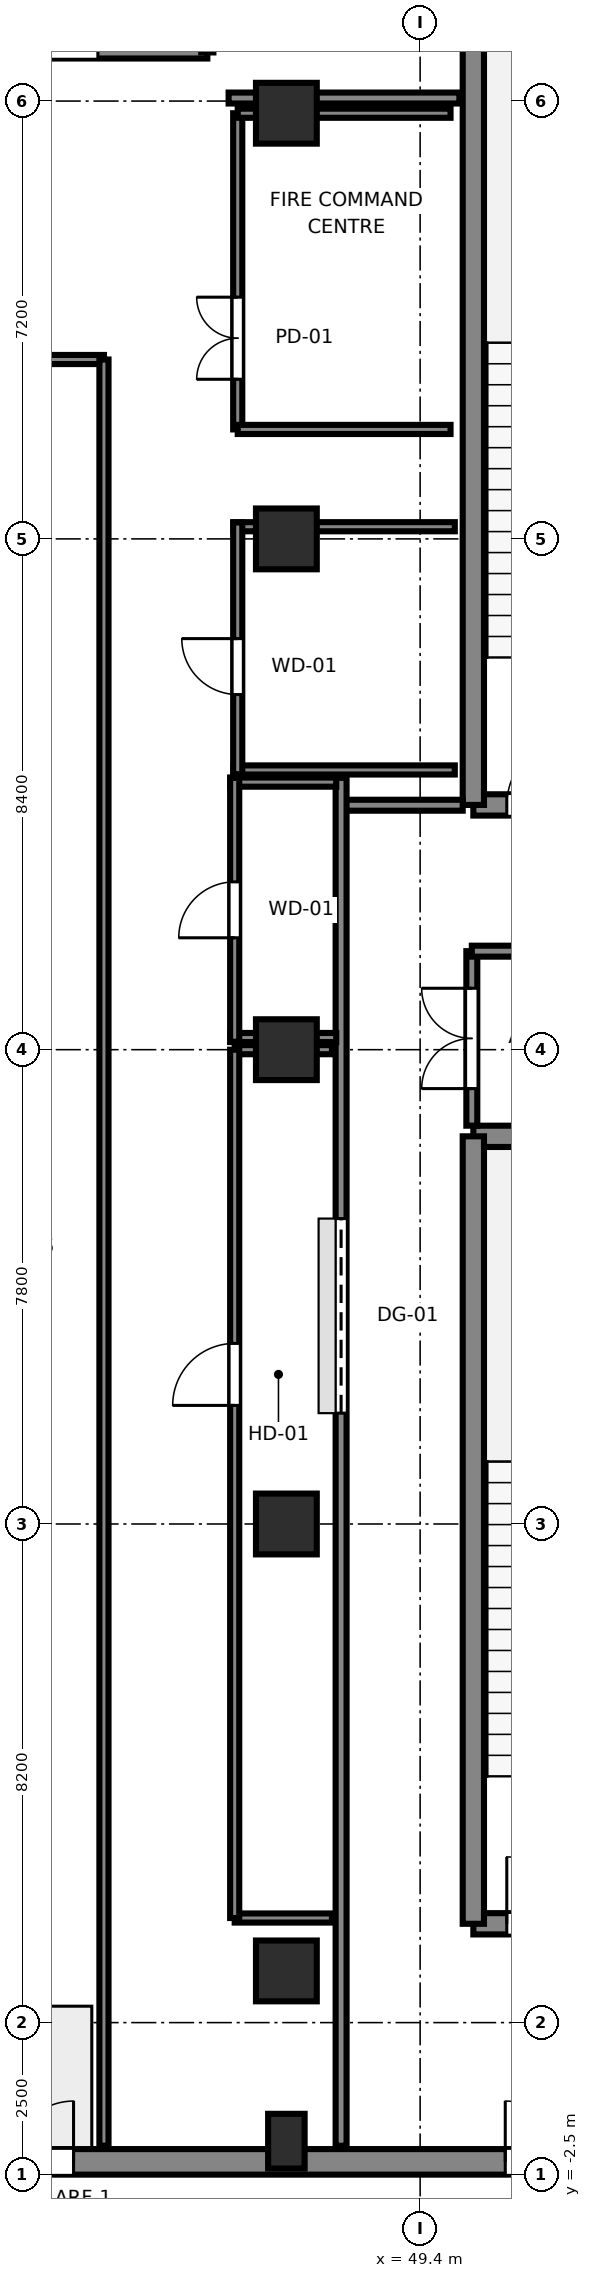
"""IFC4 building model, lengths in metres.
Left out: names, types, materials, properties, quantities, classifications, styles, units other than length and angle.
Written with IfcOpenShell. Run it as: python <this file> out.ifc"""

import sys

from ifc_helpers import new_model, si_unit, direction, frame, frame_2d, origin, origin_2d, place, context, subcontext, project, spatial, rectangle, extrude, source, transform, mapped, element, fill, save


model = new_model("IFC4")
c1 = context("Model", 3, precision=1e-05, world=origin(), true_north=direction((0.0, 1.0)))
c2 = subcontext(c1, "Body", "Model", "MODEL_VIEW")
j1 = project(units=[si_unit("LENGTHUNIT", "METRE"), si_unit("PLANEANGLEUNIT", "RADIAN")], contexts=[c1])
p1 = place(None, origin())
s1 = spatial("IfcSite", under=j1, at=p1, CompositionType="ELEMENT")
p2 = place(p1, origin())
s2 = spatial("IfcBuilding", under=s1, at=p2, CompositionType="ELEMENT")
p3 = place(p2, origin())
s3 = spatial("IfcBuildingStorey", under=s2, at=p3, CompositionType="ELEMENT", Elevation=0.0)
p4 = place(p3, frame((50.275, 1.625, 0.0), z_axis=(0.0, 0.0, 1.0), x_axis=(1.0, 0.0, 0.0)))
e1 = element("IfcWall", 1, at=p4, inside=s3, PredefinedType="SHEAR", context=c2, shape_type="SweptSolid", body=[
    extrude(rectangle(XDim=5.0, YDim=0.35, at=frame_2d((2.5, 0.0))), origin(), (0.0, 0.0, 1.0), 6.0),
])
p5 = place(p4, frame((1.65, 0.0, 0.0), z_axis=(0.0, 0.0, 1.0), x_axis=(-1.0, 0.0, 0.0)))
e2 = element("IfcOpeningElement", 2, at=p5, cuts=e1, PredefinedType="OPENING", context=c2, shape_type="SweptSolid", body=[
    extrude(rectangle(XDim=1.1, YDim=2.12, at=frame_2d((0.55, 1.06))), frame((0.0, 0.185, 0.0), z_axis=(0.0, -1.0, 0.0), x_axis=(1.0, 0.0, 0.0)), (0.0, 0.0, 1.0), 0.37),
])
p6 = place(p3, frame((55.275, 14.575, 0.0), z_axis=(0.0, 0.0, 1.0), x_axis=(-1.0, 0.0, 0.0)))
e3 = element("IfcWall", 3, at=p6, inside=s3, PredefinedType="SHEAR", context=c2, shape_type="SweptSolid", body=[
    extrude(rectangle(XDim=5.0, YDim=0.35, at=frame_2d((2.5, 0.0))), origin(), (0.0, 0.0, 1.0), 6.0),
])
p7 = place(p3, frame((50.275, 14.575, 0.0), z_axis=(0.0, 0.0, 1.0), x_axis=(0.0, -1.0, 0.0)))
e4 = element("IfcWall", 4, at=p7, inside=s3, PredefinedType="SHEAR", context=c2, shape_type="SweptSolid", body=[
    extrude(rectangle(XDim=12.95, YDim=0.35, at=frame_2d((6.475, 0.0))), origin(), (0.0, 0.0, 1.0), 6.0),
])
p8 = place(p3, frame((50.275, 20.025, 0.0), z_axis=(0.0, 0.0, 1.0), x_axis=(1.0, 0.0, 0.0)))
e5 = element("IfcWall", 5, at=p8, inside=s3, PredefinedType="SHEAR", context=c2, shape_type="SweptSolid", body=[
    extrude(rectangle(XDim=5.0, YDim=0.35, at=frame_2d((2.5, 0.0))), origin(), (0.0, 0.0, 1.0), 6.0),
])
p9 = place(p8, frame((1.65, 0.0, 0.0), z_axis=(0.0, 0.0, 1.0), x_axis=(-1.0, 0.0, 0.0)))
e6 = element("IfcOpeningElement", 6, at=p9, cuts=e5, PredefinedType="OPENING", context=c2, shape_type="SweptSolid", body=[
    extrude(rectangle(XDim=1.1, YDim=2.12, at=frame_2d((0.55, 1.06))), frame((0.0, 0.185, 0.0), z_axis=(0.0, -1.0, 0.0), x_axis=(1.0, 0.0, 0.0)), (0.0, 0.0, 1.0), 0.37),
])
p10 = place(p3, frame((50.275, 32.975, 0.0), z_axis=(0.0, 0.0, 1.0), x_axis=(0.0, -1.0, 0.0)))
e7 = element("IfcWall", 7, at=p10, inside=s3, PredefinedType="SHEAR", context=c2, shape_type="SweptSolid", body=[
    extrude(rectangle(XDim=12.95, YDim=0.35, at=frame_2d((6.475, 0.0))), origin(), (0.0, 0.0, 1.0), 6.0),
])
m1 = source(origin(), c2, "Body", "SweptSolid", [
    extrude(rectangle(XDim=1.0, YDim=1.0, at=origin_2d()), origin(), (0.0, 0.0, 1.0), 6.0),
])
for number, where, z_axis, x_axis in (
    (8, (47.2, 0.85, 0.0), (0.0, 0.0, 1.0), (1.0, 0.0, 0.0)),
    (9, (47.2, 8.2, 0.0), (0.0, 0.0, 1.0), (1.0, 0.0, 0.0)),
    (10, (47.2, 16.0, 0.0), (0.0, 0.0, 1.0), (1.0, 0.0, 0.0)),
    (11, (47.2, 24.4, 0.0), (0.0, 0.0, 1.0), (1.0, 0.0, 0.0)),
    (12, (47.2, 31.4, 0.0), (0.0, 0.0, 1.0), (1.0, 0.0, 0.0)),
):
    element("IfcColumn", number, at=place(p3, frame(where, z_axis=z_axis, x_axis=x_axis)), inside=s3, PredefinedType="COLUMN", context=c2, shape_type="MappedRepresentation", body=[
        mapped(m1, transform((0.0, 0.0, 0.0), x_axis=(1.0, 0.0, 0.0), y_axis=(0.0, 1.0, 0.0), z_axis=(0.0, 0.0, 1.0), scale=1.0)),
    ])
m2 = source(origin(), c2, "Body", "SweptSolid", [
    extrude(rectangle(XDim=0.6, YDim=0.9, at=origin_2d()), origin(), (0.0, 0.0, 1.0), 6.0),
])
p11 = place(p3, frame((47.2, -1.95, 0.0), z_axis=(0.0, 0.0, 1.0), x_axis=(1.0, 0.0, 0.0)))
e13 = element("IfcColumn", 13, at=p11, inside=s3, PredefinedType="PILASTER", context=c2, shape_type="MappedRepresentation", body=[
    mapped(m2, transform((0.0, 0.0, 0.0), x_axis=(1.0, 0.0, 0.0), y_axis=(0.0, 1.0, 0.0), z_axis=(0.0, 0.0, 1.0), scale=1.0)),
])
p12 = place(p3, frame((37.59, -2.29, 0.0), z_axis=(0.0, 0.0, 1.0), x_axis=(1.0, 0.0, 0.0)))
e14 = element("IfcWall", 14, at=p12, inside=s3, PredefinedType="SOLIDWALL", context=c2, shape_type="SweptSolid", body=[
    extrude(rectangle(XDim=27.6, YDim=0.42, at=frame_2d((13.8, 0.0))), origin(), (0.0, 0.0, 1.0), 5.74),
])
p13 = place(p12, frame((6.11, 0.0, 0.0), z_axis=(0.0, 0.0, 1.0), x_axis=(-1.0, 0.0, 0.0)))
e15 = element("IfcOpeningElement", 15, at=p13, cuts=e14, PredefinedType="OPENING", context=c2, shape_type="SweptSolid", body=[
    extrude(rectangle(XDim=2.0, YDim=2.25, at=frame_2d((1.0, 1.125))), frame((0.0, 0.22, 0.0), z_axis=(0.0, -1.0, 0.0), x_axis=(1.0, 0.0, 0.0)), (0.0, 0.0, 1.0), 0.44),
])
p14 = place(p12, frame((15.21, 0.0, 0.0), z_axis=(0.0, 0.0, 1.0), x_axis=(-1.0, 0.0, 0.0)))
e16 = element("IfcOpeningElement", 16, at=p14, cuts=e14, PredefinedType="OPENING", context=c2, shape_type="SweptSolid", body=[
    extrude(rectangle(XDim=2.0, YDim=2.25, at=frame_2d((1.0, 1.125))), frame((0.0, 0.22, 0.0), z_axis=(0.0, -1.0, 0.0), x_axis=(1.0, 0.0, 0.0)), (0.0, 0.0, 1.0), 0.44),
])
p15 = place(p12, frame((24.01, 0.0, 0.0), z_axis=(0.0, 0.0, 1.0), x_axis=(-1.0, 0.0, 0.0)))
e17 = element("IfcOpeningElement", 17, at=p15, cuts=e14, PredefinedType="OPENING", context=c2, shape_type="SweptSolid", body=[
    extrude(rectangle(XDim=2.0, YDim=2.25, at=frame_2d((1.0, 1.125))), frame((0.0, 0.22, 0.0), z_axis=(0.0, -1.0, 0.0), x_axis=(1.0, 0.0, 0.0)), (0.0, 0.0, 1.0), 0.44),
])
p16 = place(p3, frame((42.45, 32.4, 0.0), z_axis=(0.0, 0.0, 1.0), x_axis=(1.0, 0.0, 0.0)))
e18 = element("IfcWall", 18, at=p16, inside=s3, PredefinedType="SOLIDWALL", context=c2, shape_type="SweptSolid", body=[
    extrude(rectangle(XDim=3.45, YDim=0.2, at=frame_2d((1.725, 0.0))), origin(), (0.0, 0.0, 1.0), 5.74),
])
p17 = place(p16, frame((1.65, 0.0, 0.0), z_axis=(0.0, 0.0, 1.0), x_axis=(-1.0, 0.0, 0.0)))
e19 = element("IfcOpeningElement", 19, at=p17, cuts=e18, PredefinedType="OPENING", context=c2, shape_type="SweptSolid", body=[
    extrude(rectangle(XDim=1.1, YDim=2.12, at=frame_2d((0.55, 1.06))), frame((0.0, 0.11, 0.0), z_axis=(0.0, -1.0, 0.0), x_axis=(1.0, 0.0, 0.0)), (0.0, 0.0, 1.0), 0.22),
])
p18 = place(p3, frame((46.25, 31.65, 0.0), z_axis=(0.0, 0.0, 1.0), x_axis=(1.0, 0.0, 0.0)))
e20 = element("IfcWall", 20, at=p18, inside=s3, PredefinedType="PARTITIONING", context=c2, shape_type="SweptSolid", body=[
    extrude(rectangle(XDim=3.795, YDim=0.18, at=frame_2d((1.897, 0.0))), origin(), (0.0, 0.0, 1.0), 5.74),
])
p19 = place(p3, frame((50.25, 14.75, 0.0), z_axis=(0.0, 0.0, 1.0), x_axis=(0.0, 1.0, 0.0)))
e21 = element("IfcWall", 21, at=p19, inside=s3, PredefinedType="PARTITIONING", context=c2, shape_type="SweptSolid", body=[
    extrude(rectangle(XDim=2.87, YDim=0.18, at=frame_2d((1.435, 0.0))), origin(), (0.0, 0.0, 1.0), 5.74),
])
p20 = place(p19, frame((0.61, 0.0, 0.0)))
e22 = element("IfcOpeningElement", 22, at=p20, cuts=e21, PredefinedType="OPENING", context=c2, shape_type="SweptSolid", body=[
    extrude(rectangle(XDim=1.65, YDim=2.15, at=frame_2d((0.825, 1.075))), frame((0.0, 0.1, 0.0), z_axis=(0.0, -1.0, 0.0), x_axis=(1.0, 0.0, 0.0)), (0.0, 0.0, 1.0), 0.2),
])
p21 = place(p3, frame((50.25, 17.62, 0.0), z_axis=(0.0, 0.0, 1.0), x_axis=(1.0, 0.0, 0.0)))
e23 = element("IfcWall", 23, at=p21, inside=s3, PredefinedType="PARTITIONING", context=c2, shape_type="SweptSolid", body=[
    extrude(rectangle(XDim=5.15, YDim=0.18, at=frame_2d((2.575, 0.0))), origin(), (0.0, 0.0, 1.0), 5.74),
])
p22 = place(p3, frame((48.1, 20.02, 0.0), z_axis=(0.0, 0.0, 1.0), x_axis=(1.0, 0.0, 0.0)))
e24 = element("IfcWall", 24, at=p22, inside=s3, PredefinedType="PARTITIONING", context=c2, shape_type="SweptSolid", body=[
    extrude(rectangle(XDim=2.0, YDim=0.18, at=frame_2d((1.0, 0.0))), origin(), (0.0, 0.0, 1.0), 5.74),
])
p23 = place(p3, frame((48.1, -2.025, 0.0), z_axis=(0.0, 0.0, 1.0), x_axis=(0.0, 1.0, 0.0)))
e25 = element("IfcWall", 25, at=p23, inside=s3, PredefinedType="PARTITIONING", context=c2, shape_type="SweptSolid", body=[
    extrude(rectangle(XDim=22.495, YDim=0.18, at=frame_2d((11.248, 0.0))), origin(), (0.0, 0.0, 1.0), 5.74),
])
p24 = place(p23, frame((12.048, 0.0, 0.0)))
e26 = element("IfcOpeningElement", 26, at=p24, cuts=e25, PredefinedType="OPENING", context=c2, shape_type="SweptSolid", body=[
    extrude(rectangle(XDim=3.2, YDim=2.8, at=frame_2d((1.6, 1.4))), frame((0.0, 0.1, 0.0), z_axis=(0.0, -1.0, 0.0), x_axis=(1.0, 0.0, 0.0)), (0.0, 0.0, 1.0), 0.2),
])
p25 = place(p3, frame((46.4, 26.2, 0.0), z_axis=(0.0, 0.0, 1.0), x_axis=(0.0, 1.0, 0.0)))
e27 = element("IfcWall", 27, at=p25, inside=s3, PredefinedType="PARTITIONING", context=c2, shape_type="SweptSolid", body=[
    extrude(rectangle(XDim=5.2, YDim=0.15, at=frame_2d((2.6, 0.0))), origin(), (0.0, 0.0, 1.0), 5.74),
])
p26 = place(p25, frame((0.825, 0.0, 0.0)))
e28 = element("IfcOpeningElement", 28, at=p26, cuts=e27, PredefinedType="OPENING", context=c2, shape_type="SweptSolid", body=[
    extrude(rectangle(XDim=1.35, YDim=2.15, at=frame_2d((0.675, 1.075))), frame((0.0, 0.085, 0.0), z_axis=(0.0, -1.0, 0.0), x_axis=(1.0, 0.0, 0.0)), (0.0, 0.0, 1.0), 0.17),
])
p27 = place(p3, frame((46.4, 26.2, 0.0), z_axis=(0.0, 0.0, 1.0), x_axis=(1.0, 0.0, 0.0)))
e29 = element("IfcWall", 29, at=p27, inside=s3, PredefinedType="PARTITIONING", context=c2, shape_type="SweptSolid", body=[
    extrude(rectangle(XDim=3.5, YDim=0.15, at=frame_2d((1.75, 0.0))), origin(), (0.0, 0.0, 1.0), 5.74),
])
p28 = place(p3, frame((46.4, 31.4, 0.0), z_axis=(0.0, 0.0, 1.0), x_axis=(1.0, 0.0, 0.0)))
e30 = element("IfcWall", 30, at=p28, inside=s3, PredefinedType="PARTITIONING", context=c2, shape_type="SweptSolid", body=[
    extrude(rectangle(XDim=3.5, YDim=0.15, at=frame_2d((1.75, 0.0))), origin(), (0.0, 0.0, 1.0), 4.914),
])
p29 = place(p3, frame((38.0, 27.35, 0.0), z_axis=(0.0, 0.0, 1.0), x_axis=(1.0, 0.0, 0.0)))
e31 = element("IfcWall", 31, at=p29, inside=s3, PredefinedType="PARTITIONING", context=c2, shape_type="SweptSolid", body=[
    extrude(rectangle(XDim=6.2, YDim=0.15, at=frame_2d((3.1, 0.0))), origin(), (0.0, 0.0, 1.0), 5.74),
])
p30 = place(p29, frame((2.275, 0.0, 0.0)))
e32 = element("IfcOpeningElement", 32, at=p30, cuts=e31, PredefinedType="OPENING", context=c2, shape_type="SweptSolid", body=[
    extrude(rectangle(XDim=1.65, YDim=2.15, at=frame_2d((0.825, 1.075))), frame((0.0, 0.085, 0.0), z_axis=(0.0, -1.0, 0.0), x_axis=(1.0, 0.0, 0.0)), (0.0, 0.0, 1.0), 0.17),
])
p31 = place(p3, frame((44.2, -2.025, 0.0), z_axis=(0.0, 0.0, 1.0), x_axis=(0.0, 1.0, 0.0)))
e33 = element("IfcWall", 33, at=p31, inside=s3, PredefinedType="PARTITIONING", context=c2, shape_type="SweptSolid", body=[
    extrude(rectangle(XDim=29.375, YDim=0.15, at=frame_2d((14.688, 0.0))), origin(), (0.0, 0.0, 1.0), 5.276),
])
p32 = place(p3, frame((46.28, 16.2, 0.0), z_axis=(0.0, 0.0, 1.0), x_axis=(1.0, 0.0, 0.0)))
e34 = element("IfcWall", 34, at=p32, inside=s3, PredefinedType="PARTITIONING", context=c2, shape_type="SweptSolid", body=[
    extrude(rectangle(XDim=1.74, YDim=0.15, at=frame_2d((0.87, 0.0))), origin(), (0.0, 0.0, 1.0), 4.914),
])
p33 = place(p3, frame((46.28, 20.4, 0.0), z_axis=(0.0, 0.0, 1.0), x_axis=(1.0, 0.0, 0.0)))
e35 = element("IfcWall", 35, at=p33, inside=s3, PredefinedType="PARTITIONING", context=c2, shape_type="SweptSolid", body=[
    extrude(rectangle(XDim=1.74, YDim=0.15, at=frame_2d((0.87, 0.0))), origin(), (0.0, 0.0, 1.0), 5.74),
])
p34 = place(p3, frame((46.35, 16.13, 0.0), z_axis=(0.0, 0.0, 1.0), x_axis=(0.0, 1.0, 0.0)))
e36 = element("IfcWall", 36, at=p34, inside=s3, PredefinedType="PARTITIONING", context=c2, shape_type="SweptSolid", body=[
    extrude(rectangle(XDim=4.34, YDim=0.15, at=frame_2d((2.17, 0.0))), origin(), (0.0, 0.0, 1.0), 5.74),
])
p35 = place(p34, frame((1.71, 0.0, 0.0)))
e37 = element("IfcOpeningElement", 37, at=p35, cuts=e36, PredefinedType="OPENING", context=c2, shape_type="SweptSolid", body=[
    extrude(rectangle(XDim=0.92, YDim=2.01, at=frame_2d((0.46, 1.005))), frame((0.0, 0.085, 0.0), z_axis=(0.0, -1.0, 0.0), x_axis=(1.0, 0.0, 0.0)), (0.0, 0.0, 1.0), 0.17),
])
p36 = place(p3, frame((46.33, 20.6, 0.0), z_axis=(0.0, 0.0, 1.0), x_axis=(1.0, 0.0, 0.0)))
e38 = element("IfcWall", 38, at=p36, inside=s3, PredefinedType="PARTITIONING", context=c2, shape_type="SweptSolid", body=[
    extrude(rectangle(XDim=3.64, YDim=0.15, at=frame_2d((1.82, 0.0))), origin(), (0.0, 0.0, 1.0), 5.74),
])
p37 = place(p3, frame((46.33, 24.6, 0.0), z_axis=(0.0, 0.0, 1.0), x_axis=(1.0, 0.0, 0.0)))
e39 = element("IfcWall", 39, at=p37, inside=s3, PredefinedType="PARTITIONING", context=c2, shape_type="SweptSolid", body=[
    extrude(rectangle(XDim=3.64, YDim=0.15, at=frame_2d((1.82, 0.0))), origin(), (0.0, 0.0, 1.0), 4.914),
])
p38 = place(p3, frame((46.4, 20.53, 0.0), z_axis=(0.0, 0.0, 1.0), x_axis=(0.0, 1.0, 0.0)))
e40 = element("IfcWall", 40, at=p38, inside=s3, PredefinedType="PARTITIONING", context=c2, shape_type="SweptSolid", body=[
    extrude(rectangle(XDim=4.14, YDim=0.15, at=frame_2d((2.07, 0.0))), origin(), (0.0, 0.0, 1.0), 5.74),
])
p39 = place(p38, frame((1.31, 0.0, 0.0)))
e41 = element("IfcOpeningElement", 41, at=p39, cuts=e40, PredefinedType="OPENING", context=c2, shape_type="SweptSolid", body=[
    extrude(rectangle(XDim=0.92, YDim=2.01, at=frame_2d((0.46, 1.005))), frame((0.0, 0.085, 0.0), z_axis=(0.0, -1.0, 0.0), x_axis=(1.0, 0.0, 0.0)), (0.0, 0.0, 1.0), 0.17),
])
p40 = place(p3, frame((46.35, 1.72, 0.0), z_axis=(0.0, 0.0, 1.0), x_axis=(1.0, 0.0, 0.0)))
e42 = element("IfcWall", 42, at=p40, inside=s3, PredefinedType="PARTITIONING", context=c2, shape_type="SweptSolid", body=[
    extrude(rectangle(XDim=1.6, YDim=0.15, at=frame_2d((0.8, 0.0))), origin(), (0.0, 0.0, 1.0), 5.74),
])
p41 = place(p3, frame((46.35, 16.0, 0.0), z_axis=(0.0, 0.0, 1.0), x_axis=(1.0, 0.0, 0.0)))
e43 = element("IfcWall", 43, at=p41, inside=s3, PredefinedType="PARTITIONING", context=c2, shape_type="SweptSolid", body=[
    extrude(rectangle(XDim=1.6, YDim=0.15, at=frame_2d((0.8, 0.0))), origin(), (0.0, 0.0, 1.0), 4.914),
])
p42 = place(p3, frame((46.35, 1.72, 0.0), z_axis=(0.0, 0.0, 1.0), x_axis=(0.0, 1.0, 0.0)))
e44 = element("IfcWall", 44, at=p42, inside=s3, PredefinedType="PARTITIONING", context=c2, shape_type="SweptSolid", body=[
    extrude(rectangle(XDim=14.28, YDim=0.15, at=frame_2d((7.14, 0.0))), origin(), (0.0, 0.0, 1.0), 5.74),
])
p43 = place(p42, frame((8.43, 0.0, 0.0)))
e45 = element("IfcOpeningElement", 45, at=p43, cuts=e44, PredefinedType="OPENING", context=c2, shape_type="SweptSolid", body=[
    extrude(rectangle(XDim=1.02, YDim=2.03, at=frame_2d((0.51, 1.015))), frame((0.0, 0.085, 0.0), z_axis=(0.0, -1.0, 0.0), x_axis=(1.0, 0.0, 0.0)), (0.0, 0.0, 1.0), 0.17),
])
m3 = source(origin(), c2, "Body", "SweptSolid", [
    extrude(rectangle(XDim=2.0, YDim=2.25, at=frame_2d((1.0, 1.125))), frame((0.0, 0.025, 0.0), z_axis=(0.0, -1.0, 0.0), x_axis=(1.0, 0.0, 0.0)), (0.0, 0.0, 1.0), 0.05),
])
p44 = place(p13, origin())
e46 = element("IfcDoor", 46, at=p44, inside=s3, OperationType="DOUBLE_DOOR_SINGLE_SWING", PredefinedType="DOOR", context=c2, shape_type="MappedRepresentation", body=[
    mapped(m3, transform((0.0, 0.0, 0.0), x_axis=(1.0, 0.0, 0.0), y_axis=(0.0, 1.0, 0.0), z_axis=(0.0, 0.0, 1.0), scale=1.0)),
])
fill(e15, e46)
p45 = place(p14, origin())
e47 = element("IfcDoor", 47, at=p45, inside=s3, OperationType="DOUBLE_DOOR_SINGLE_SWING", PredefinedType="DOOR", context=c2, shape_type="MappedRepresentation", body=[
    mapped(m3, transform((0.0, 0.0, 0.0), x_axis=(1.0, 0.0, 0.0), y_axis=(0.0, 1.0, 0.0), z_axis=(0.0, 0.0, 1.0), scale=1.0)),
])
fill(e16, e47)
m4 = source(origin(), c2, "Body", "SweptSolid", [
    extrude(rectangle(XDim=1.1, YDim=2.12, at=frame_2d((0.55, 1.06))), frame((0.0, 0.025, 0.0), z_axis=(0.0, -1.0, 0.0), x_axis=(1.0, 0.0, 0.0)), (0.0, 0.0, 1.0), 0.05),
])
p46 = place(p17, origin())
e48 = element("IfcDoor", 48, at=p46, inside=s3, OperationType="SINGLE_SWING_LEFT", PredefinedType="DOOR", context=c2, shape_type="MappedRepresentation", body=[
    mapped(m4, transform((0.0, 0.0, 0.0), x_axis=(1.0, 0.0, 0.0), y_axis=(0.0, 1.0, 0.0), z_axis=(0.0, 0.0, 1.0), scale=1.0)),
])
fill(e19, e48)
p47 = place(p5, origin())
e49 = element("IfcDoor", 49, at=p47, inside=s3, OperationType="SINGLE_SWING_LEFT", PredefinedType="DOOR", context=c2, shape_type="MappedRepresentation", body=[
    mapped(m4, transform((0.0, 0.0, 0.0), x_axis=(1.0, 0.0, 0.0), y_axis=(0.0, 1.0, 0.0), z_axis=(0.0, 0.0, 1.0), scale=1.0)),
])
fill(e2, e49)
p48 = place(p9, origin())
e50 = element("IfcDoor", 50, at=p48, inside=s3, OperationType="SINGLE_SWING_RIGHT", PredefinedType="DOOR", context=c2, shape_type="MappedRepresentation", body=[
    mapped(m4, transform((0.0, 0.0, 0.0), x_axis=(1.0, 0.0, 0.0), y_axis=(0.0, 1.0, 0.0), z_axis=(0.0, 0.0, 1.0), scale=1.0)),
])
fill(e6, e50)
m5 = source(origin(), c2, "Body", "SweptSolid", [
    extrude(rectangle(XDim=1.65, YDim=2.15, at=frame_2d((0.825, 1.075))), frame((0.0, 0.025, 0.0), z_axis=(0.0, -1.0, 0.0), x_axis=(1.0, 0.0, 0.0)), (0.0, 0.0, 1.0), 0.05),
])
p49 = place(p20, origin())
e51 = element("IfcDoor", 51, at=p49, inside=s3, OperationType="DOUBLE_DOOR_SINGLE_SWING", PredefinedType="DOOR", context=c2, shape_type="MappedRepresentation", body=[
    mapped(m5, transform((0.0, 0.0, 0.0), x_axis=(1.0, 0.0, 0.0), y_axis=(0.0, 1.0, 0.0), z_axis=(0.0, 0.0, 1.0), scale=1.0)),
])
fill(e22, e51)
m6 = source(origin(), c2, "Body", "SweptSolid", [
    extrude(rectangle(XDim=1.35, YDim=2.15, at=frame_2d((0.675, 1.075))), frame((0.0, 0.025, 0.0), z_axis=(0.0, -1.0, 0.0), x_axis=(1.0, 0.0, 0.0)), (0.0, 0.0, 1.0), 0.05),
])
p50 = place(p26, origin())
e52 = element("IfcDoor", 52, at=p50, inside=s3, OperationType="DOUBLE_DOOR_SINGLE_SWING", PredefinedType="DOOR", context=c2, shape_type="MappedRepresentation", body=[
    mapped(m6, transform((0.0, 0.0, 0.0), x_axis=(1.0, 0.0, 0.0), y_axis=(0.0, 1.0, 0.0), z_axis=(0.0, 0.0, 1.0), scale=1.0)),
])
fill(e28, e52)
m7 = source(origin(), c2, "Body", "SweptSolid", [
    extrude(rectangle(XDim=0.92, YDim=2.01, at=frame_2d((0.46, 1.005))), frame((0.0, 0.025, 0.0), z_axis=(0.0, -1.0, 0.0), x_axis=(1.0, 0.0, 0.0)), (0.0, 0.0, 1.0), 0.05),
])
p51 = place(p35, origin())
e53 = element("IfcDoor", 53, at=p51, inside=s3, OperationType="SINGLE_SWING_LEFT", PredefinedType="DOOR", context=c2, shape_type="MappedRepresentation", body=[
    mapped(m7, transform((0.0, 0.0, 0.0), x_axis=(1.0, 0.0, 0.0), y_axis=(0.0, 1.0, 0.0), z_axis=(0.0, 0.0, 1.0), scale=1.0)),
])
fill(e37, e53)
p52 = place(p39, origin())
e54 = element("IfcDoor", 54, at=p52, inside=s3, OperationType="SINGLE_SWING_RIGHT", PredefinedType="DOOR", context=c2, shape_type="MappedRepresentation", body=[
    mapped(m7, transform((0.0, 0.0, 0.0), x_axis=(1.0, 0.0, 0.0), y_axis=(0.0, 1.0, 0.0), z_axis=(0.0, 0.0, 1.0), scale=1.0)),
])
fill(e41, e54)
m8 = source(origin(), c2, "Body", "SweptSolid", [
    extrude(rectangle(XDim=1.02, YDim=2.03, at=frame_2d((0.51, 1.015))), frame((0.0, 0.025, 0.0), z_axis=(0.0, -1.0, 0.0), x_axis=(1.0, 0.0, 0.0)), (0.0, 0.0, 1.0), 0.05),
])
p53 = place(p43, origin())
e55 = element("IfcDoor", 55, at=p53, inside=s3, OperationType="SINGLE_SWING_LEFT", PredefinedType="DOOR", context=c2, shape_type="MappedRepresentation", body=[
    mapped(m8, transform((0.0, 0.0, 0.0), x_axis=(1.0, 0.0, 0.0), y_axis=(0.0, 1.0, 0.0), z_axis=(0.0, 0.0, 1.0), scale=1.0)),
])
fill(e45, e55)
m9 = source(origin(), c2, "Body", "SweptSolid", [
    extrude(rectangle(XDim=3.2, YDim=2.8, at=frame_2d((1.6, 1.4))), frame((0.0, 0.025, 0.0), z_axis=(0.0, -1.0, 0.0), x_axis=(1.0, 0.0, 0.0)), (0.0, 0.0, 1.0), 0.05),
])
p54 = place(p24, origin())
e56 = element("IfcDoor", 56, at=p54, inside=s3, OperationType="ROLLINGUP", PredefinedType="GATE", context=c2, shape_type="MappedRepresentation", body=[
    mapped(m9, transform((0.0, 0.0, 0.0), x_axis=(1.0, 0.0, 0.0), y_axis=(0.0, 1.0, 0.0), z_axis=(0.0, 0.0, 1.0), scale=1.0)),
])
fill(e26, e56)
save(model, sys.argv[1])
